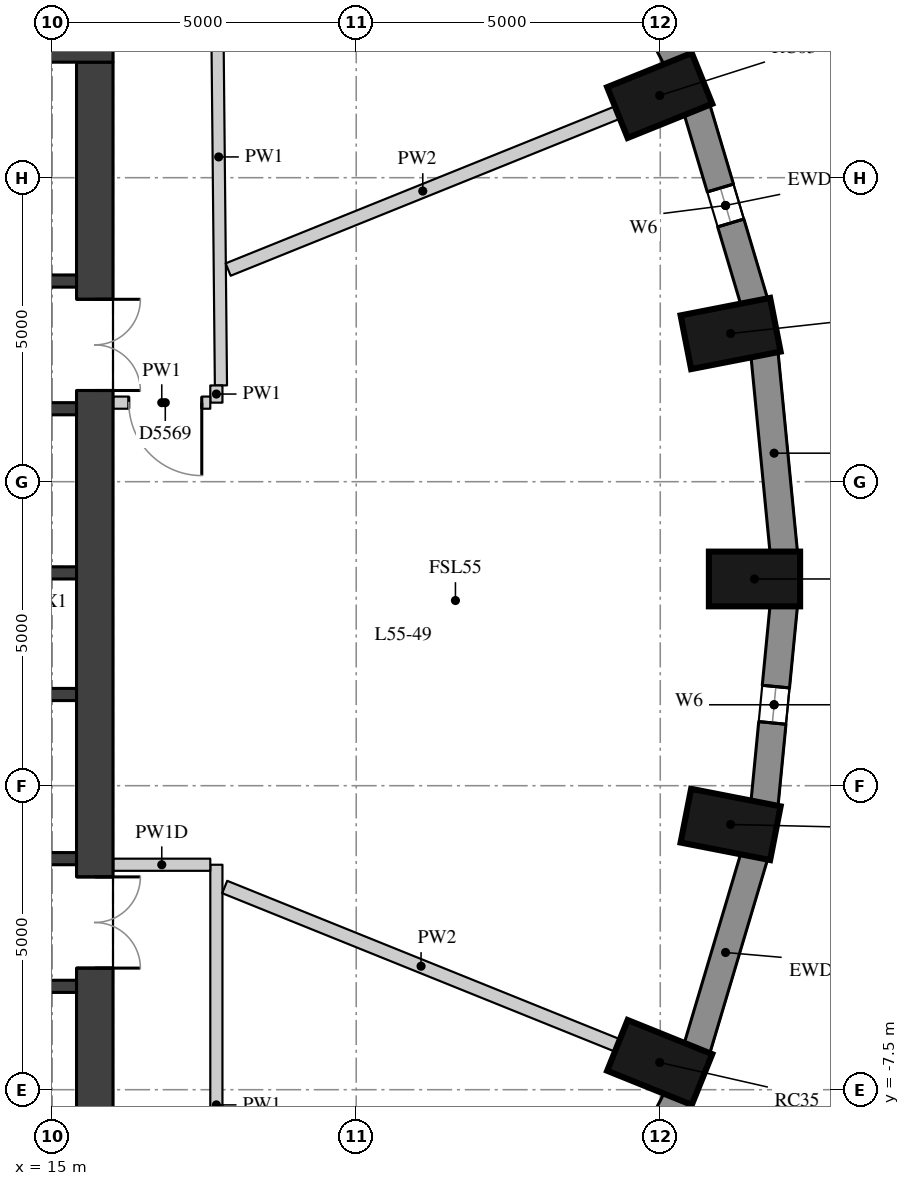
"""IFC4 building model, lengths in metres.
Left out: names, types, materials, properties, quantities, classifications, styles, units other than length and angle.
Written with IfcOpenShell. Run it as: python <this file> out.ifc"""

import sys

from ifc_helpers import new_model, si_unit, direction, frame, frame_2d, origin, origin_2d, place, context, subcontext, project, spatial, rectangle, extrude, element, fill, save


model = new_model("IFC4")
c1 = context("Model", 3, precision=1e-05, world=origin(), true_north=direction((0.0, 1.0)))
c2 = subcontext(c1, "Body", "Model", "MODEL_VIEW")
j1 = project(units=[si_unit("LENGTHUNIT", "METRE"), si_unit("PLANEANGLEUNIT", "RADIAN")], contexts=[c1])
p1 = place(None, origin())
s1 = spatial("IfcSite", under=j1, at=p1, CompositionType="ELEMENT")
p2 = place(p1, origin())
s2 = spatial("IfcBuilding", under=s1, at=p2, CompositionType="ELEMENT")
p3 = place(p2, frame((0.0, 0.0, 195.8)))
s3 = spatial("IfcBuildingStorey", under=s2, at=p3, CompositionType="ELEMENT", Elevation=195.8)
for number, where, z_axis, x_axis in (
    (1, (26.55, 0.9, 0.0), (0.0, 0.0, 1.0), (1.0, 0.0, 0.0)),
    (2, (26.157, 4.937, 0.0), (0.0, 0.0, 1.0), (0.981, 0.192, 0.0)),
    (3, (24.991, 8.852, 0.0), (0.0, 0.0, 1.0), (0.927, 0.374, 0.0)),
    (4, (24.991, -7.052, 0.0), (0.0, 0.0, 1.0), (0.927, -0.374, 0.0)),
    (5, (26.157, -3.137, 0.0), (0.0, 0.0, 1.0), (0.981, -0.192, 0.0)),
):
    element("IfcColumn", number, at=place(p3, frame(where, z_axis=z_axis, x_axis=x_axis)), inside=s3, PredefinedType="COLUMN", context=c2, shape_type="SweptSolid", body=[
        extrude(rectangle(XDim=1.5, YDim=0.9, at=origin_2d()), origin(), (0.0, 0.0, 1.0), 3.3),
    ])
p4 = place(p3, frame((27.032, 1.33, 0.0), z_axis=(0.0, 0.0, 1.0), x_axis=(-0.096824116835, 0.995301507283, 0.0)))
e6 = element("IfcWall", 6, at=p4, inside=s3, PredefinedType="SOLIDWALL", context=c2, shape_type="SweptSolid", body=[
    extrude(rectangle(XDim=3.293, YDim=0.45, at=frame_2d((1.646, 0.0))), origin(), (0.0, 0.0, 1.0), 3.02),
])
p5 = place(p3, frame((26.548, 5.452, 0.0), z_axis=(0.0, 0.0, 1.0), x_axis=(-0.285444972963, 0.958395099847, 0.0)))
e7 = element("IfcWall", 7, at=p5, inside=s3, PredefinedType="SOLIDWALL", context=c2, shape_type="SweptSolid", body=[
    extrude(rectangle(XDim=3.32, YDim=0.45, at=frame_2d((1.66, 0.0))), origin(), (0.0, 0.0, 1.0), 3.02),
])
p6 = place(p5, frame((1.36, 0.0, 0.4)))
e8 = element("IfcOpeningElement", 8, at=p6, cuts=e7, PredefinedType="OPENING", context=c2, shape_type="SweptSolid", body=[
    extrude(rectangle(XDim=0.6, YDim=1.75, at=frame_2d((0.3, 0.875))), frame((0.0, 0.235, 0.0), z_axis=(0.0, -1.0, 0.0), x_axis=(1.0, 0.0, 0.0)), (0.0, 0.0, 1.0), 0.47),
])
p7 = place(p3, frame((25.278, 9.432, 0.0), z_axis=(0.0, 0.0, 1.0), x_axis=(-0.460175500475, 0.887827972505, 0.0)))
e9 = element("IfcWall", 9, at=p7, inside=s3, PredefinedType="SOLIDWALL", context=c2, shape_type="SweptSolid", body=[
    extrude(rectangle(XDim=3.371, YDim=0.45, at=frame_2d((1.685, 0.0))), origin(), (0.0, 0.0, 1.0), 3.02),
])
p8 = place(p3, frame((23.727, -10.624, 0.0), z_axis=(0.0, 0.0, 1.0), x_axis=(0.460175500475, 0.887827972505, 0.0)))
e10 = element("IfcWall", 10, at=p8, inside=s3, PredefinedType="SOLIDWALL", context=c2, shape_type="SweptSolid", body=[
    extrude(rectangle(XDim=3.371, YDim=0.45, at=frame_2d((1.685, 0.0))), origin(), (0.0, 0.0, 1.0), 3.02),
])
p9 = place(p8, frame((1.385, 0.0, 0.4)))
e11 = element("IfcOpeningElement", 11, at=p9, cuts=e10, PredefinedType="OPENING", context=c2, shape_type="SweptSolid", body=[
    extrude(rectangle(XDim=0.6, YDim=1.75, at=frame_2d((0.3, 0.875))), frame((0.0, 0.235, 0.0), z_axis=(0.0, -1.0, 0.0), x_axis=(1.0, 0.0, 0.0)), (0.0, 0.0, 1.0), 0.47),
])
p10 = place(p3, frame((25.6, -6.834, 0.0), z_axis=(0.0, 0.0, 1.0), x_axis=(0.285444972963, 0.958395099847, 0.0)))
e12 = element("IfcWall", 12, at=p10, inside=s3, PredefinedType="SOLIDWALL", context=c2, shape_type="SweptSolid", body=[
    extrude(rectangle(XDim=3.32, YDim=0.45, at=frame_2d((1.66, 0.0))), origin(), (0.0, 0.0, 1.0), 3.02),
])
p11 = place(p3, frame((26.713, -2.808, 0.0), z_axis=(0.0, 0.0, 1.0), x_axis=(0.096816972749, 0.995302202242, 0.0)))
e13 = element("IfcWall", 13, at=p11, inside=s3, PredefinedType="SOLIDWALL", context=c2, shape_type="SweptSolid", body=[
    extrude(rectangle(XDim=3.293, YDim=0.45, at=frame_2d((1.646, 0.0))), origin(), (0.0, 0.0, 1.0), 3.02),
])
p12 = place(p11, frame((1.347, 0.0, 0.4)))
e14 = element("IfcOpeningElement", 14, at=p12, cuts=e13, PredefinedType="OPENING", context=c2, shape_type="SweptSolid", body=[
    extrude(rectangle(XDim=0.6, YDim=1.75, at=frame_2d((0.3, 0.875))), frame((0.0, 0.235, 0.0), z_axis=(0.0, -1.0, 0.0), x_axis=(1.0, 0.0, 0.0)), (0.0, 0.0, 1.0), 0.47),
])
p13 = place(p3, frame((15.7, -9.4, 0.0), z_axis=(0.0, 0.0, 1.0), x_axis=(0.0, 1.0, 0.0)))
e15 = element("IfcWall", 15, at=p13, inside=s3, PredefinedType="SHEAR", context=c2, shape_type="SweptSolid", body=[
    extrude(rectangle(XDim=18.8, YDim=0.6, at=frame_2d((9.4, 0.0))), origin(), (0.0, 0.0, 1.0), 3.02),
])
p14 = place(p13, frame((13.4, 0.0, 0.0)))
e16 = element("IfcOpeningElement", 16, at=p14, cuts=e15, PredefinedType="OPENING", context=c2, shape_type="SweptSolid", body=[
    extrude(rectangle(XDim=1.5, YDim=2.1, at=frame_2d((0.75, 1.05))), frame((0.0, 0.31, 0.0), z_axis=(0.0, -1.0, 0.0), x_axis=(1.0, 0.0, 0.0)), (0.0, 0.0, 1.0), 0.62),
])
p15 = place(p13, frame((3.9, 0.0, 0.0)))
e17 = element("IfcOpeningElement", 17, at=p15, cuts=e15, PredefinedType="OPENING", context=c2, shape_type="SweptSolid", body=[
    extrude(rectangle(XDim=1.5, YDim=2.1, at=frame_2d((0.75, 1.05))), frame((0.0, 0.31, 0.0), z_axis=(0.0, -1.0, 0.0), x_axis=(1.0, 0.0, 0.0)), (0.0, 0.0, 1.0), 0.62),
])
p16 = place(p3, frame((4.0, 9.7, 0.0), z_axis=(0.0, 0.0, 1.0), x_axis=(1.0, 0.0, 0.0)))
e18 = element("IfcWall", 18, at=p16, inside=s3, PredefinedType="SHEAR", context=c2, shape_type="SweptSolid", body=[
    extrude(rectangle(XDim=12.0, YDim=0.6, at=frame_2d((6.0, 0.0))), origin(), (0.0, 0.0, 1.0), 3.02),
])
p17 = place(p3, frame((4.6, 5.8, 0.0), z_axis=(0.0, 0.0, 1.0), x_axis=(1.0, 0.0, 0.0)))
e19 = element("IfcWall", 19, at=p17, inside=s3, PredefinedType="SHEAR", context=c2, shape_type="SweptSolid", body=[
    extrude(rectangle(XDim=10.8, YDim=0.2, at=frame_2d((5.4, 0.0))), origin(), (0.0, 0.0, 1.0), 3.02),
])
p18 = place(p17, frame((7.05, 0.0, 0.0)))
e20 = element("IfcOpeningElement", 20, at=p18, cuts=e19, PredefinedType="OPENING", context=c2, shape_type="SweptSolid", body=[
    extrude(rectangle(XDim=1.1, YDim=2.1, at=frame_2d((0.55, 1.05))), frame((0.0, 0.11, 0.0), z_axis=(0.0, -1.0, 0.0), x_axis=(1.0, 0.0, 0.0)), (0.0, 0.0, 1.0), 0.22),
])
p19 = place(p17, frame((9.05, 0.0, 0.0)))
e21 = element("IfcOpeningElement", 21, at=p19, cuts=e19, PredefinedType="OPENING", context=c2, shape_type="SweptSolid", body=[
    extrude(rectangle(XDim=1.1, YDim=2.1, at=frame_2d((0.55, 1.05))), frame((0.0, 0.11, 0.0), z_axis=(0.0, -1.0, 0.0), x_axis=(1.0, 0.0, 0.0)), (0.0, 0.0, 1.0), 0.22),
])
p20 = place(p3, frame((4.6, 3.7, 0.0), z_axis=(0.0, 0.0, 1.0), x_axis=(1.0, 0.0, 0.0)))
e22 = element("IfcWall", 22, at=p20, inside=s3, PredefinedType="SHEAR", context=c2, shape_type="SweptSolid", body=[
    extrude(rectangle(XDim=10.8, YDim=0.2, at=frame_2d((5.4, 0.0))), origin(), (0.0, 0.0, 1.0), 3.02),
])
p21 = place(p20, frame((6.6, 0.0, 0.0)))
e23 = element("IfcOpeningElement", 23, at=p21, cuts=e22, PredefinedType="OPENING", context=c2, shape_type="SweptSolid", body=[
    extrude(rectangle(XDim=1.1, YDim=2.1, at=frame_2d((0.55, 1.05))), frame((0.0, 0.11, 0.0), z_axis=(0.0, -1.0, 0.0), x_axis=(1.0, 0.0, 0.0)), (0.0, 0.0, 1.0), 0.22),
])
p22 = place(p20, frame((8.9, 0.0, 0.0)))
e24 = element("IfcOpeningElement", 24, at=p22, cuts=e22, PredefinedType="OPENING", context=c2, shape_type="SweptSolid", body=[
    extrude(rectangle(XDim=1.1, YDim=2.1, at=frame_2d((0.55, 1.05))), frame((0.0, 0.11, 0.0), z_axis=(0.0, -1.0, 0.0), x_axis=(1.0, 0.0, 0.0)), (0.0, 0.0, 1.0), 0.22),
])
for number, where, z_axis, x_axis in (
    (25, (4.6, 1.0, 0.0), (0.0, 0.0, 1.0), (1.0, 0.0, 0.0)),
    (26, (4.6, -1.0, 0.0), (0.0, 0.0, 1.0), (1.0, 0.0, 0.0)),
):
    element("IfcWall", number, at=place(p3, frame(where, z_axis=z_axis, x_axis=x_axis)), inside=s3, PredefinedType="SHEAR", context=c2, shape_type="SweptSolid", body=[
        extrude(rectangle(XDim=10.8, YDim=0.2, at=frame_2d((5.4, 0.0))), origin(), (0.0, 0.0, 1.0), 3.02),
    ])
p23 = place(p3, frame((4.6, -3.7, 0.0), z_axis=(0.0, 0.0, 1.0), x_axis=(1.0, 0.0, 0.0)))
e27 = element("IfcWall", 27, at=p23, inside=s3, PredefinedType="SHEAR", context=c2, shape_type="SweptSolid", body=[
    extrude(rectangle(XDim=10.8, YDim=0.2, at=frame_2d((5.4, 0.0))), origin(), (0.0, 0.0, 1.0), 3.02),
])
p24 = place(p23, frame((6.6, 0.0, 0.0)))
e28 = element("IfcOpeningElement", 28, at=p24, cuts=e27, PredefinedType="OPENING", context=c2, shape_type="SweptSolid", body=[
    extrude(rectangle(XDim=1.1, YDim=2.1, at=frame_2d((0.55, 1.05))), frame((0.0, 0.11, 0.0), z_axis=(0.0, -1.0, 0.0), x_axis=(1.0, 0.0, 0.0)), (0.0, 0.0, 1.0), 0.22),
])
p25 = place(p23, frame((8.9, 0.0, 0.0)))
e29 = element("IfcOpeningElement", 29, at=p25, cuts=e27, PredefinedType="OPENING", context=c2, shape_type="SweptSolid", body=[
    extrude(rectangle(XDim=1.1, YDim=2.1, at=frame_2d((0.55, 1.05))), frame((0.0, 0.11, 0.0), z_axis=(0.0, -1.0, 0.0), x_axis=(1.0, 0.0, 0.0)), (0.0, 0.0, 1.0), 0.22),
])
p26 = place(p3, frame((4.6, -5.8, 0.0), z_axis=(0.0, 0.0, 1.0), x_axis=(1.0, 0.0, 0.0)))
e30 = element("IfcWall", 30, at=p26, inside=s3, PredefinedType="SHEAR", context=c2, shape_type="SweptSolid", body=[
    extrude(rectangle(XDim=10.8, YDim=0.2, at=frame_2d((5.4, 0.0))), origin(), (0.0, 0.0, 1.0), 3.02),
])
p27 = place(p3, frame((17.7, -3.8, 0.0), z_axis=(0.0, 0.0, 1.0), x_axis=(0.0, -1.0, 0.0)))
e31 = element("IfcWall", 31, at=p27, inside=s3, PredefinedType="PARTITIONING", context=c2, shape_type="SweptSolid", body=[
    extrude(rectangle(XDim=7.9, YDim=0.2, at=frame_2d((3.95, 0.0))), origin(), (0.0, 0.0, 1.0), 3.02),
])
p28 = place(p3, frame((17.701, 11.6, 0.0), z_axis=(0.0, 0.0, 1.0), x_axis=(0.009840700525, -0.999951579134, 0.0)))
e32 = element("IfcWall", 32, at=p28, inside=s3, PredefinedType="PARTITIONING", context=c2, shape_type="SweptSolid", body=[
    extrude(rectangle(XDim=7.517, YDim=0.2, at=frame_2d((3.759, 0.0))), origin(), (0.0, 0.0, 1.0), 3.02),
])
p29 = place(p3, frame((17.7, 4.083, 0.0), z_axis=(0.0, 0.0, 1.0), x_axis=(0.0, -1.0, 0.0)))
e33 = element("IfcWall", 33, at=p29, inside=s3, PredefinedType="PARTITIONING", context=c2, shape_type="SweptSolid", body=[
    extrude(rectangle(XDim=0.283, YDim=0.2, at=frame_2d((0.142, 0.0))), origin(), (0.0, 0.0, 1.0), 3.02),
])
p30 = place(p3, frame((17.6, 3.8, 0.0), z_axis=(0.0, 0.0, 1.0), x_axis=(-1.0, 0.0, 0.0)))
e34 = element("IfcWall", 34, at=p30, inside=s3, PredefinedType="PARTITIONING", context=c2, shape_type="SweptSolid", body=[
    extrude(rectangle(XDim=1.596, YDim=0.2, at=frame_2d((0.798, 0.0))), origin(), (0.0, 0.0, 1.0), 3.02),
])
p31 = place(p30, frame((0.14, 0.0, 0.0)))
e35 = element("IfcOpeningElement", 35, at=p31, cuts=e34, PredefinedType="OPENING", context=c2, shape_type="SweptSolid", body=[
    extrude(rectangle(XDim=1.2, YDim=2.1, at=frame_2d((0.6, 1.05))), frame((0.0, 0.11, 0.0), z_axis=(0.0, -1.0, 0.0), x_axis=(1.0, 0.0, 0.0)), (0.0, 0.0, 1.0), 0.22),
])
p32 = place(p3, frame((16.004, -3.8, 0.0), z_axis=(0.0, 0.0, 1.0), x_axis=(1.0, 0.0, 0.0)))
e36 = element("IfcWall", 36, at=p32, inside=s3, PredefinedType="PARTITIONING", context=c2, shape_type="SweptSolid", body=[
    extrude(rectangle(XDim=1.596, YDim=0.2, at=frame_2d((0.798, 0.0))), origin(), (0.0, 0.0, 1.0), 2.47),
])
p33 = place(p3, frame((24.295, 8.571, 0.0), z_axis=(0.0, 0.0, 1.0), x_axis=(-0.927397147779, -0.374078240869, 0.0)))
e37 = element("IfcWall", 37, at=p33, inside=s3, PredefinedType="PARTITIONING", context=c2, shape_type="SweptSolid", body=[
    extrude(rectangle(XDim=6.903, YDim=0.22, at=frame_2d((3.452, 0.0))), origin(), (0.0, 0.0, 1.0), 3.02),
])
p34 = place(p3, frame((24.295, -6.771, 0.0), z_axis=(0.0, 0.0, 1.0), x_axis=(-0.927387137769, 0.374103056256, 0.0)))
e38 = element("IfcWall", 38, at=p34, inside=s3, PredefinedType="PARTITIONING", context=c2, shape_type="SweptSolid", body=[
    extrude(rectangle(XDim=6.964, YDim=0.22, at=frame_2d((3.482, 0.0))), origin(), (0.0, 0.0, 1.0), 3.02),
])
p35 = place(p6, origin())
e39 = element("IfcWindow", 39, at=p35, inside=s3, PartitioningType="SINGLE_PANEL", PredefinedType="WINDOW", context=c2, shape_type="SweptSolid", body=[
    extrude(rectangle(XDim=0.6, YDim=1.75, at=frame_2d((0.3, 0.875))), frame((0.0, 0.035, 0.0), z_axis=(0.0, -1.0, 0.0), x_axis=(1.0, 0.0, 0.0)), (0.0, 0.0, 1.0), 0.06),
])
fill(e8, e39)
p36 = place(p12, origin())
e40 = element("IfcWindow", 40, at=p36, inside=s3, PartitioningType="SINGLE_PANEL", PredefinedType="WINDOW", context=c2, shape_type="SweptSolid", body=[
    extrude(rectangle(XDim=0.6, YDim=1.75, at=frame_2d((0.3, 0.875))), frame((0.0, 0.035, 0.0), z_axis=(0.0, -1.0, 0.0), x_axis=(1.0, 0.0, 0.0)), (0.0, 0.0, 1.0), 0.06),
])
fill(e14, e40)
p37 = place(p14, origin())
e41 = element("IfcDoor", 41, at=p37, inside=s3, OperationType="DOUBLE_DOOR_SINGLE_SWING", PredefinedType="DOOR", context=c2, shape_type="SweptSolid", body=[
    extrude(rectangle(XDim=1.5, YDim=2.1, at=frame_2d((0.75, 1.05))), frame((0.0, 0.025, 0.0), z_axis=(0.0, -1.0, 0.0), x_axis=(1.0, 0.0, 0.0)), (0.0, 0.0, 1.0), 0.05),
])
fill(e16, e41)
p38 = place(p15, origin())
e42 = element("IfcDoor", 42, at=p38, inside=s3, OperationType="DOUBLE_DOOR_SINGLE_SWING", PredefinedType="DOOR", context=c2, shape_type="SweptSolid", body=[
    extrude(rectangle(XDim=1.5, YDim=2.1, at=frame_2d((0.75, 1.05))), frame((0.0, 0.025, 0.0), z_axis=(0.0, -1.0, 0.0), x_axis=(1.0, 0.0, 0.0)), (0.0, 0.0, 1.0), 0.05),
])
fill(e17, e42)
p39 = place(p31, origin())
e43 = element("IfcDoor", 43, at=p39, inside=s3, OperationType="SINGLE_SWING_LEFT", PredefinedType="DOOR", context=c2, shape_type="SweptSolid", body=[
    extrude(rectangle(XDim=1.2, YDim=2.1, at=frame_2d((0.6, 1.05))), frame((0.0, 0.025, 0.0), z_axis=(0.0, -1.0, 0.0), x_axis=(1.0, 0.0, 0.0)), (0.0, 0.0, 1.0), 0.05),
])
fill(e35, e43)
save(model, sys.argv[1])
